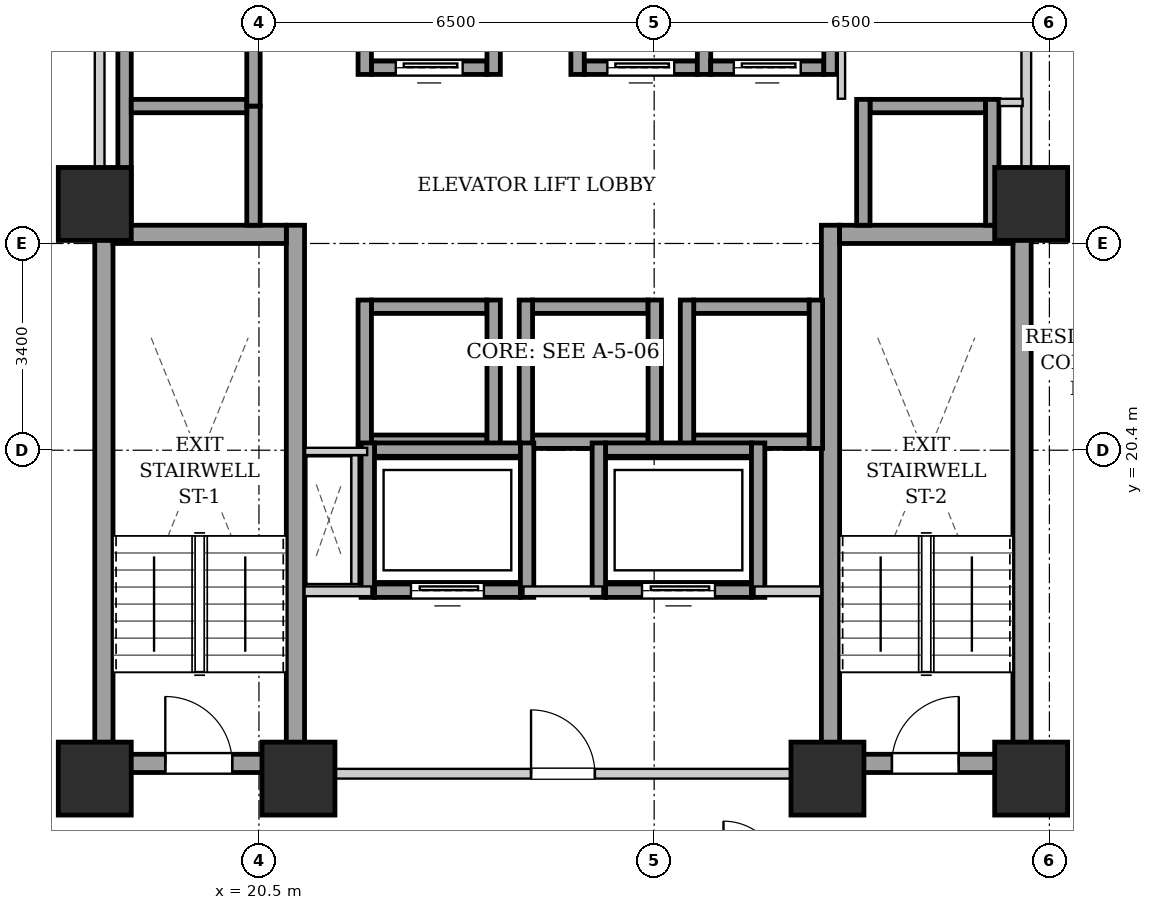
"""IFC4 building model, lengths in metres.
Left out: names, types, materials, properties, quantities, classifications, styles, units other than length and angle.
Written with IfcOpenShell. Run it as: python <this file> out.ifc"""

import sys

from ifc_helpers import new_model, si_unit, direction, frame, frame_2d, origin, origin_2d, place, context, subcontext, project, spatial, rectangle, extrude, element, fill, save


model = new_model("IFC4")
c1 = context("Model", 3, precision=1e-05, world=origin(), true_north=direction((0.0, 1.0)))
c2 = subcontext(c1, "Body", "Model", "MODEL_VIEW")
j1 = project(units=[si_unit("LENGTHUNIT", "METRE"), si_unit("PLANEANGLEUNIT", "RADIAN")], contexts=[c1])
p1 = place(None, origin())
s1 = spatial("IfcSite", under=j1, at=p1, CompositionType="ELEMENT")
p2 = place(p1, origin())
s2 = spatial("IfcBuilding", under=s1, at=p2, CompositionType="ELEMENT")
p3 = place(p2, frame((0.0, 0.0, 57.8)))
s3 = spatial("IfcBuildingStorey", under=s2, at=p3, CompositionType="ELEMENT", Elevation=57.8)
for number, where, z_axis, x_axis in (
    (1, (17.8, 15.0, 0.0), (0.0, 0.0, 1.0), (1.0, 0.0, 0.0)),
    (2, (21.15, 15.0, 0.0), (0.0, 0.0, 1.0), (1.0, 0.0, 0.0)),
    (3, (29.85, 15.0, 0.0), (0.0, 0.0, 1.0), (1.0, 0.0, 0.0)),
    (4, (33.2, 15.0, 0.0), (0.0, 0.0, 1.0), (1.0, 0.0, 0.0)),
    (5, (17.8, 24.45, 0.0), (0.0, 0.0, 1.0), (1.0, 0.0, 0.0)),
    (6, (33.2, 24.45, 0.0), (0.0, 0.0, 1.0), (1.0, 0.0, 0.0)),
):
    element("IfcColumn", number, at=place(p3, frame(where, z_axis=z_axis, x_axis=x_axis)), inside=s3, PredefinedType="COLUMN", context=c2, shape_type="SweptSolid", body=[
        extrude(rectangle(XDim=1.2, YDim=1.2, at=origin_2d()), origin(), (0.0, 0.0, 1.0), 3.2),
    ])
for number, where, z_axis, x_axis in (
    (7, (17.95, 15.1, 0.0), (0.0, 0.0, 1.0), (0.0, 1.0, 0.0)),
    (8, (21.1, 15.1, 0.0), (0.0, 0.0, 1.0), (0.0, 1.0, 0.0)),
):
    element("IfcWall", number, at=place(p3, frame(where, z_axis=z_axis, x_axis=x_axis)), inside=s3, PredefinedType="SHEAR", context=c2, shape_type="SweptSolid", body=[
        extrude(rectangle(XDim=9.0, YDim=0.3, at=frame_2d((4.5, 0.0))), origin(), (0.0, 0.0, 1.0), 2.94),
    ])
p4 = place(p3, frame((18.1, 23.95, 0.0), z_axis=(0.0, 0.0, 1.0), x_axis=(1.0, 0.0, 0.0)))
e9 = element("IfcWall", 9, at=p4, inside=s3, PredefinedType="SHEAR", context=c2, shape_type="SweptSolid", body=[
    extrude(rectangle(XDim=2.85, YDim=0.3, at=frame_2d((1.425, 0.0))), origin(), (0.0, 0.0, 1.0), 2.94),
])
p5 = place(p3, frame((18.1, 15.25, 0.0), z_axis=(0.0, 0.0, 1.0), x_axis=(1.0, 0.0, 0.0)))
e10 = element("IfcWall", 10, at=p5, inside=s3, PredefinedType="SHEAR", context=c2, shape_type="SweptSolid", body=[
    extrude(rectangle(XDim=2.85, YDim=0.3, at=frame_2d((1.425, 0.0))), origin(), (0.0, 0.0, 1.0), 2.94),
])
p6 = place(p5, frame((0.86, 0.0, 0.0)))
e11 = element("IfcOpeningElement", 11, at=p6, cuts=e10, PredefinedType="OPENING", context=c2, shape_type="SweptSolid", body=[
    extrude(rectangle(XDim=1.1, YDim=2.05, at=frame_2d((0.55, 1.025))), frame((0.0, 0.16, 0.0), z_axis=(0.0, -1.0, 0.0), x_axis=(1.0, 0.0, 0.0)), (0.0, 0.0, 1.0), 0.32),
])
for number, where, z_axis, x_axis in (
    (12, (29.9, 15.1, 0.0), (0.0, 0.0, 1.0), (0.0, 1.0, 0.0)),
    (13, (33.05, 15.1, 0.0), (0.0, 0.0, 1.0), (0.0, 1.0, 0.0)),
):
    element("IfcWall", number, at=place(p3, frame(where, z_axis=z_axis, x_axis=x_axis)), inside=s3, PredefinedType="SHEAR", context=c2, shape_type="SweptSolid", body=[
        extrude(rectangle(XDim=9.0, YDim=0.3, at=frame_2d((4.5, 0.0))), origin(), (0.0, 0.0, 1.0), 2.94),
    ])
p7 = place(p3, frame((30.05, 23.95, 0.0), z_axis=(0.0, 0.0, 1.0), x_axis=(1.0, 0.0, 0.0)))
e14 = element("IfcWall", 14, at=p7, inside=s3, PredefinedType="SHEAR", context=c2, shape_type="SweptSolid", body=[
    extrude(rectangle(XDim=2.85, YDim=0.3, at=frame_2d((1.425, 0.0))), origin(), (0.0, 0.0, 1.0), 2.94),
])
p8 = place(p3, frame((30.05, 15.25, 0.0), z_axis=(0.0, 0.0, 1.0), x_axis=(1.0, 0.0, 0.0)))
e15 = element("IfcWall", 15, at=p8, inside=s3, PredefinedType="SHEAR", context=c2, shape_type="SweptSolid", body=[
    extrude(rectangle(XDim=2.85, YDim=0.3, at=frame_2d((1.425, 0.0))), origin(), (0.0, 0.0, 1.0), 2.94),
])
p9 = place(p8, frame((0.86, 0.0, 0.0)))
e16 = element("IfcOpeningElement", 16, at=p9, cuts=e15, PredefinedType="OPENING", context=c2, shape_type="SweptSolid", body=[
    extrude(rectangle(XDim=1.1, YDim=2.05, at=frame_2d((0.55, 1.025))), frame((0.0, 0.16, 0.0), z_axis=(0.0, -1.0, 0.0), x_axis=(1.0, 0.0, 0.0)), (0.0, 0.0, 1.0), 0.32),
])
p10 = place(p3, frame((22.35, 26.69, 0.0), z_axis=(0.0, 0.0, 1.0), x_axis=(1.0, 0.0, 0.0)))
e17 = element("IfcWall", 17, at=p10, inside=s3, PredefinedType="SHEAR", context=c2, shape_type="SweptSolid", body=[
    extrude(rectangle(XDim=1.9, YDim=0.22, at=frame_2d((0.95, 0.0))), origin(), (0.0, 0.0, 1.0), 2.94),
])
p11 = place(p10, frame((0.4, 0.0, 0.0)))
e18 = element("IfcOpeningElement", 18, at=p11, cuts=e17, PredefinedType="OPENING", context=c2, shape_type="SweptSolid", body=[
    extrude(rectangle(XDim=1.1, YDim=2.15, at=frame_2d((0.55, 1.075))), frame((0.0, 0.12, 0.0), z_axis=(0.0, -1.0, 0.0), x_axis=(1.0, 0.0, 0.0)), (0.0, 0.0, 1.0), 0.24),
])
for number, where, z_axis, x_axis in (
    (19, (22.24, 26.58, 0.0), (0.0, 0.0, 1.0), (0.0, 1.0, 0.0)),
    (20, (24.36, 26.58, 0.0), (0.0, 0.0, 1.0), (0.0, 1.0, 0.0)),
):
    element("IfcWall", number, at=place(p3, frame(where, z_axis=z_axis, x_axis=x_axis)), inside=s3, PredefinedType="SHEAR", context=c2, shape_type="SweptSolid", body=[
        extrude(rectangle(XDim=2.44, YDim=0.22, at=frame_2d((1.22, 0.0))), origin(), (0.0, 0.0, 1.0), 2.94),
    ])
p12 = place(p3, frame((25.85, 26.69, 0.0), z_axis=(0.0, 0.0, 1.0), x_axis=(1.0, 0.0, 0.0)))
e21 = element("IfcWall", 21, at=p12, inside=s3, PredefinedType="SHEAR", context=c2, shape_type="SweptSolid", body=[
    extrude(rectangle(XDim=1.86, YDim=0.22, at=frame_2d((0.93, 0.0))), origin(), (0.0, 0.0, 1.0), 2.94),
])
p13 = place(p12, frame((0.38, 0.0, 0.0)))
e22 = element("IfcOpeningElement", 22, at=p13, cuts=e21, PredefinedType="OPENING", context=c2, shape_type="SweptSolid", body=[
    extrude(rectangle(XDim=1.1, YDim=2.15, at=frame_2d((0.55, 1.075))), frame((0.0, 0.12, 0.0), z_axis=(0.0, -1.0, 0.0), x_axis=(1.0, 0.0, 0.0)), (0.0, 0.0, 1.0), 0.24),
])
for number, where, z_axis, x_axis in (
    (23, (25.74, 26.58, 0.0), (0.0, 0.0, 1.0), (0.0, 1.0, 0.0)),
    (24, (27.82, 26.58, 0.0), (0.0, 0.0, 1.0), (0.0, 1.0, 0.0)),
):
    element("IfcWall", number, at=place(p3, frame(where, z_axis=z_axis, x_axis=x_axis)), inside=s3, PredefinedType="SHEAR", context=c2, shape_type="SweptSolid", body=[
        extrude(rectangle(XDim=2.44, YDim=0.22, at=frame_2d((1.22, 0.0))), origin(), (0.0, 0.0, 1.0), 2.94),
    ])
p14 = place(p3, frame((27.93, 26.69, 0.0), z_axis=(0.0, 0.0, 1.0), x_axis=(1.0, 0.0, 0.0)))
e25 = element("IfcWall", 25, at=p14, inside=s3, PredefinedType="SHEAR", context=c2, shape_type="SweptSolid", body=[
    extrude(rectangle(XDim=1.86, YDim=0.22, at=frame_2d((0.93, 0.0))), origin(), (0.0, 0.0, 1.0), 2.94),
])
p15 = place(p14, frame((0.38, 0.0, 0.0)))
e26 = element("IfcOpeningElement", 26, at=p15, cuts=e25, PredefinedType="OPENING", context=c2, shape_type="SweptSolid", body=[
    extrude(rectangle(XDim=1.1, YDim=2.15, at=frame_2d((0.55, 1.075))), frame((0.0, 0.12, 0.0), z_axis=(0.0, -1.0, 0.0), x_axis=(1.0, 0.0, 0.0)), (0.0, 0.0, 1.0), 0.24),
])
p16 = place(p3, frame((29.9, 26.58, 0.0), z_axis=(0.0, 0.0, 1.0), x_axis=(0.0, 1.0, 0.0)))
e27 = element("IfcWall", 27, at=p16, inside=s3, PredefinedType="SHEAR", context=c2, shape_type="SweptSolid", body=[
    extrude(rectangle(XDim=2.44, YDim=0.22, at=frame_2d((1.22, 0.0))), origin(), (0.0, 0.0, 1.0), 2.94),
])
for number, where, z_axis, x_axis in (
    (28, (22.35, 20.54, 0.0), (0.0, 0.0, 1.0), (1.0, 0.0, 0.0)),
    (29, (22.35, 22.76, 0.0), (0.0, 0.0, 1.0), (1.0, 0.0, 0.0)),
):
    element("IfcWall", number, at=place(p3, frame(where, z_axis=z_axis, x_axis=x_axis)), inside=s3, PredefinedType="SHEAR", context=c2, shape_type="SweptSolid", body=[
        extrude(rectangle(XDim=1.9, YDim=0.22, at=frame_2d((0.95, 0.0))), origin(), (0.0, 0.0, 1.0), 2.94),
    ])
for number, where, z_axis, x_axis in (
    (30, (22.24, 20.43, 0.0), (0.0, 0.0, 1.0), (0.0, 1.0, 0.0)),
    (31, (24.36, 20.43, 0.0), (0.0, 0.0, 1.0), (0.0, 1.0, 0.0)),
):
    element("IfcWall", number, at=place(p3, frame(where, z_axis=z_axis, x_axis=x_axis)), inside=s3, PredefinedType="SHEAR", context=c2, shape_type="SweptSolid", body=[
        extrude(rectangle(XDim=2.44, YDim=0.22, at=frame_2d((1.22, 0.0))), origin(), (0.0, 0.0, 1.0), 2.94),
    ])
for number, where, z_axis, x_axis in (
    (32, (25.0, 20.54, 0.0), (0.0, 0.0, 1.0), (1.0, 0.0, 0.0)),
    (33, (25.0, 22.76, 0.0), (0.0, 0.0, 1.0), (1.0, 0.0, 0.0)),
):
    element("IfcWall", number, at=place(p3, frame(where, z_axis=z_axis, x_axis=x_axis)), inside=s3, PredefinedType="SHEAR", context=c2, shape_type="SweptSolid", body=[
        extrude(rectangle(XDim=1.9, YDim=0.22, at=frame_2d((0.95, 0.0))), origin(), (0.0, 0.0, 1.0), 2.94),
    ])
for number, where, z_axis, x_axis in (
    (34, (24.89, 20.43, 0.0), (0.0, 0.0, 1.0), (0.0, 1.0, 0.0)),
    (35, (27.01, 20.43, 0.0), (0.0, 0.0, 1.0), (0.0, 1.0, 0.0)),
):
    element("IfcWall", number, at=place(p3, frame(where, z_axis=z_axis, x_axis=x_axis)), inside=s3, PredefinedType="SHEAR", context=c2, shape_type="SweptSolid", body=[
        extrude(rectangle(XDim=2.44, YDim=0.22, at=frame_2d((1.22, 0.0))), origin(), (0.0, 0.0, 1.0), 2.94),
    ])
for number, where, z_axis, x_axis in (
    (36, (27.65, 20.54, 0.0), (0.0, 0.0, 1.0), (1.0, 0.0, 0.0)),
    (37, (27.65, 22.76, 0.0), (0.0, 0.0, 1.0), (1.0, 0.0, 0.0)),
):
    element("IfcWall", number, at=place(p3, frame(where, z_axis=z_axis, x_axis=x_axis)), inside=s3, PredefinedType="SHEAR", context=c2, shape_type="SweptSolid", body=[
        extrude(rectangle(XDim=1.9, YDim=0.22, at=frame_2d((0.95, 0.0))), origin(), (0.0, 0.0, 1.0), 2.94),
    ])
for number, where, z_axis, x_axis in (
    (38, (27.54, 20.43, 0.0), (0.0, 0.0, 1.0), (0.0, 1.0, 0.0)),
    (39, (29.66, 20.43, 0.0), (0.0, 0.0, 1.0), (0.0, 1.0, 0.0)),
):
    element("IfcWall", number, at=place(p3, frame(where, z_axis=z_axis, x_axis=x_axis)), inside=s3, PredefinedType="SHEAR", context=c2, shape_type="SweptSolid", body=[
        extrude(rectangle(XDim=2.44, YDim=0.22, at=frame_2d((1.22, 0.0))), origin(), (0.0, 0.0, 1.0), 2.94),
    ])
p17 = place(p3, frame((18.29, 24.1, 0.0), z_axis=(0.0, 0.0, 1.0), x_axis=(0.0, 1.0, 0.0)))
e40 = element("IfcWall", 40, at=p17, inside=s3, PredefinedType="SHEAR", context=c2, shape_type="SweptSolid", body=[
    extrude(rectangle(XDim=4.14, YDim=0.22, at=frame_2d((2.07, 0.0))), origin(), (0.0, 0.0, 1.0), 2.94),
])
p18 = place(p3, frame((20.41, 24.1, 0.0), z_axis=(0.0, 0.0, 1.0), x_axis=(0.0, 1.0, 0.0)))
e41 = element("IfcWall", 41, at=p18, inside=s3, PredefinedType="SHEAR", context=c2, shape_type="SweptSolid", body=[
    extrude(rectangle(XDim=1.96, YDim=0.22, at=frame_2d((0.98, 0.0))), origin(), (0.0, 0.0, 1.0), 2.94),
])
p19 = place(p3, frame((18.4, 26.06, 0.0), z_axis=(0.0, 0.0, 1.0), x_axis=(1.0, 0.0, 0.0)))
e42 = element("IfcWall", 42, at=p19, inside=s3, PredefinedType="SHEAR", context=c2, shape_type="SweptSolid", body=[
    extrude(rectangle(XDim=1.9, YDim=0.22, at=frame_2d((0.95, 0.0))), origin(), (0.0, 0.0, 1.0), 2.94),
])
p20 = place(p3, frame((20.41, 26.06, 0.0), z_axis=(0.0, 0.0, 1.0), x_axis=(0.0, 1.0, 0.0)))
e43 = element("IfcWall", 43, at=p20, inside=s3, PredefinedType="SHEAR", context=c2, shape_type="SweptSolid", body=[
    extrude(rectangle(XDim=2.18, YDim=0.22, at=frame_2d((1.09, 0.0))), origin(), (0.0, 0.0, 1.0), 2.94),
])
p21 = place(p3, frame((30.55, 26.06, 0.0), z_axis=(0.0, 0.0, 1.0), x_axis=(1.0, 0.0, 0.0)))
e44 = element("IfcWall", 44, at=p21, inside=s3, PredefinedType="SHEAR", context=c2, shape_type="SweptSolid", body=[
    extrude(rectangle(XDim=1.9, YDim=0.22, at=frame_2d((0.95, 0.0))), origin(), (0.0, 0.0, 1.0), 2.94),
])
for number, where, z_axis, x_axis in (
    (45, (30.44, 24.1, 0.0), (0.0, 0.0, 1.0), (0.0, 1.0, 0.0)),
    (46, (32.56, 24.1, 0.0), (0.0, 0.0, 1.0), (0.0, 1.0, 0.0)),
):
    element("IfcWall", number, at=place(p3, frame(where, z_axis=z_axis, x_axis=x_axis)), inside=s3, PredefinedType="SHEAR", context=c2, shape_type="SweptSolid", body=[
        extrude(rectangle(XDim=2.07, YDim=0.22, at=frame_2d((1.035, 0.0))), origin(), (0.0, 0.0, 1.0), 2.94),
    ])
p22 = place(p3, frame((22.4, 18.09, 0.0), z_axis=(0.0, 0.0, 1.0), x_axis=(1.0, 0.0, 0.0)))
e47 = element("IfcWall", 47, at=p22, inside=s3, PredefinedType="SHEAR", context=c2, shape_type="SweptSolid", body=[
    extrude(rectangle(XDim=2.4, YDim=0.22, at=frame_2d((1.2, 0.0))), origin(), (0.0, 0.0, 1.0), 2.94),
])
p23 = place(p22, frame((0.6, 0.0, 0.0)))
e48 = element("IfcOpeningElement", 48, at=p23, cuts=e47, PredefinedType="OPENING", context=c2, shape_type="SweptSolid", body=[
    extrude(rectangle(XDim=1.2, YDim=2.15, at=frame_2d((0.6, 1.075))), frame((0.0, 0.12, 0.0), z_axis=(0.0, -1.0, 0.0), x_axis=(1.0, 0.0, 0.0)), (0.0, 0.0, 1.0), 0.24),
])
p24 = place(p3, frame((22.4, 20.41, 0.0), z_axis=(0.0, 0.0, 1.0), x_axis=(1.0, 0.0, 0.0)))
e49 = element("IfcWall", 49, at=p24, inside=s3, PredefinedType="SHEAR", context=c2, shape_type="SweptSolid", body=[
    extrude(rectangle(XDim=2.4, YDim=0.22, at=frame_2d((1.2, 0.0))), origin(), (0.0, 0.0, 1.0), 2.94),
])
for number, where, z_axis, x_axis in (
    (50, (22.29, 17.98, 0.0), (0.0, 0.0, 1.0), (0.0, 1.0, 0.0)),
    (51, (24.91, 17.98, 0.0), (0.0, 0.0, 1.0), (0.0, 1.0, 0.0)),
):
    element("IfcWall", number, at=place(p3, frame(where, z_axis=z_axis, x_axis=x_axis)), inside=s3, PredefinedType="SHEAR", context=c2, shape_type="SweptSolid", body=[
        extrude(rectangle(XDim=2.54, YDim=0.22, at=frame_2d((1.27, 0.0))), origin(), (0.0, 0.0, 1.0), 2.94),
    ])
p25 = place(p3, frame((26.2, 18.09, 0.0), z_axis=(0.0, 0.0, 1.0), x_axis=(1.0, 0.0, 0.0)))
e52 = element("IfcWall", 52, at=p25, inside=s3, PredefinedType="SHEAR", context=c2, shape_type="SweptSolid", body=[
    extrude(rectangle(XDim=2.4, YDim=0.22, at=frame_2d((1.2, 0.0))), origin(), (0.0, 0.0, 1.0), 2.94),
])
p26 = place(p25, frame((0.6, 0.0, 0.0)))
e53 = element("IfcOpeningElement", 53, at=p26, cuts=e52, PredefinedType="OPENING", context=c2, shape_type="SweptSolid", body=[
    extrude(rectangle(XDim=1.2, YDim=2.15, at=frame_2d((0.6, 1.075))), frame((0.0, 0.12, 0.0), z_axis=(0.0, -1.0, 0.0), x_axis=(1.0, 0.0, 0.0)), (0.0, 0.0, 1.0), 0.24),
])
p27 = place(p3, frame((26.2, 20.41, 0.0), z_axis=(0.0, 0.0, 1.0), x_axis=(1.0, 0.0, 0.0)))
e54 = element("IfcWall", 54, at=p27, inside=s3, PredefinedType="SHEAR", context=c2, shape_type="SweptSolid", body=[
    extrude(rectangle(XDim=2.4, YDim=0.22, at=frame_2d((1.2, 0.0))), origin(), (0.0, 0.0, 1.0), 2.94),
])
for number, where, z_axis, x_axis in (
    (55, (26.09, 17.98, 0.0), (0.0, 0.0, 1.0), (0.0, 1.0, 0.0)),
    (56, (28.71, 17.98, 0.0), (0.0, 0.0, 1.0), (0.0, 1.0, 0.0)),
):
    element("IfcWall", number, at=place(p3, frame(where, z_axis=z_axis, x_axis=x_axis)), inside=s3, PredefinedType="SHEAR", context=c2, shape_type="SweptSolid", body=[
        extrude(rectangle(XDim=2.54, YDim=0.22, at=frame_2d((1.27, 0.0))), origin(), (0.0, 0.0, 1.0), 2.94),
    ])
p28 = place(p3, frame((21.25, 15.08, 0.0), z_axis=(0.0, 0.0, 1.0), x_axis=(1.0, 0.0, 0.0)))
e57 = element("IfcWall", 57, at=p28, inside=s3, PredefinedType="PARTITIONING", context=c2, shape_type="SweptSolid", body=[
    extrude(rectangle(XDim=8.5, YDim=0.16, at=frame_2d((4.25, 0.0))), origin(), (0.0, 0.0, 1.0), 2.232),
])
p29 = place(p28, frame((3.725, 0.0, 0.0)))
e58 = element("IfcOpeningElement", 58, at=p29, cuts=e57, PredefinedType="OPENING", context=c2, shape_type="SweptSolid", body=[
    extrude(rectangle(XDim=1.05, YDim=2.05, at=frame_2d((0.525, 1.025))), frame((0.0, 0.09, 0.0), z_axis=(0.0, -1.0, 0.0), x_axis=(1.0, 0.0, 0.0)), (0.0, 0.0, 1.0), 0.18),
])
p30 = place(p3, frame((21.25, 18.08, 0.0), z_axis=(0.0, 0.0, 1.0), x_axis=(1.0, 0.0, 0.0)))
e59 = element("IfcWall", 59, at=p30, inside=s3, PredefinedType="PARTITIONING", context=c2, shape_type="SweptSolid", body=[
    extrude(rectangle(XDim=1.1, YDim=0.16, at=frame_2d((0.55, 0.0))), origin(), (0.0, 0.0, 1.0), 2.94),
])
p31 = place(p3, frame((24.85, 18.08, 0.0), z_axis=(0.0, 0.0, 1.0), x_axis=(1.0, 0.0, 0.0)))
e60 = element("IfcWall", 60, at=p31, inside=s3, PredefinedType="PARTITIONING", context=c2, shape_type="SweptSolid", body=[
    extrude(rectangle(XDim=1.3, YDim=0.16, at=frame_2d((0.65, 0.0))), origin(), (0.0, 0.0, 1.0), 2.94),
])
p32 = place(p3, frame((28.65, 18.08, 0.0), z_axis=(0.0, 0.0, 1.0), x_axis=(1.0, 0.0, 0.0)))
e61 = element("IfcWall", 61, at=p32, inside=s3, PredefinedType="PARTITIONING", context=c2, shape_type="SweptSolid", body=[
    extrude(rectangle(XDim=1.1, YDim=0.16, at=frame_2d((0.55, 0.0))), origin(), (0.0, 0.0, 1.0), 2.94),
])
for number, where, z_axis, x_axis in (
    (62, (17.88, 24.12, 0.0), (0.0, 0.0, 1.0), (0.0, 1.0, 0.0)),
    (63, (33.12, 24.12, 0.0), (0.0, 0.0, 1.0), (0.0, 1.0, 0.0)),
):
    element("IfcWall", number, at=place(p3, frame(where, z_axis=z_axis, x_axis=x_axis)), inside=s3, PredefinedType="PARTITIONING", context=c2, shape_type="SweptSolid", body=[
        extrude(rectangle(XDim=4.76, YDim=0.16, at=frame_2d((2.38, 0.0))), origin(), (0.0, 0.0, 1.0), 2.275),
    ])
p33 = place(p3, frame((22.08, 18.2, 0.0), z_axis=(0.0, 0.0, 1.0), x_axis=(0.0, 1.0, 0.0)))
e64 = element("IfcWall", 64, at=p33, inside=s3, PredefinedType="PARTITIONING", context=c2, shape_type="SweptSolid", body=[
    extrude(rectangle(XDim=2.12, YDim=0.12, at=frame_2d((1.06, 0.0))), origin(), (0.0, 0.0, 1.0), 2.94),
])
p34 = place(p3, frame((22.28, 20.38, 0.0), z_axis=(0.0, 0.0, 1.0), x_axis=(-1.0, 0.0, 0.0)))
e65 = element("IfcWall", 65, at=p34, inside=s3, PredefinedType="PARTITIONING", context=c2, shape_type="SweptSolid", body=[
    extrude(rectangle(XDim=1.02, YDim=0.12, at=frame_2d((0.51, 0.0))), origin(), (0.0, 0.0, 1.0), 2.94),
])
p35 = place(p3, frame((30.08, 26.18, 0.0), z_axis=(0.0, 0.0, 1.0), x_axis=(0.0, 1.0, 0.0)))
e66 = element("IfcWall", 66, at=p35, inside=s3, PredefinedType="PARTITIONING", context=c2, shape_type="SweptSolid", body=[
    extrude(rectangle(XDim=2.68, YDim=0.12, at=frame_2d((1.34, 0.0))), origin(), (0.0, 0.0, 1.0), 2.94),
])
p36 = place(p3, frame((32.68, 26.12, 0.0), z_axis=(0.0, 0.0, 1.0), x_axis=(1.0, 0.0, 0.0)))
e67 = element("IfcWall", 67, at=p36, inside=s3, PredefinedType="PARTITIONING", context=c2, shape_type="SweptSolid", body=[
    extrude(rectangle(XDim=0.38, YDim=0.12, at=frame_2d((0.19, 0.0))), origin(), (0.0, 0.0, 1.0), 2.94),
])
p37 = place(p6, origin())
e68 = element("IfcDoor", 68, at=p37, inside=s3, OperationType="SINGLE_SWING_LEFT", PredefinedType="DOOR", context=c2, shape_type="SweptSolid", body=[
    extrude(rectangle(XDim=1.1, YDim=2.05, at=frame_2d((0.55, 1.025))), frame((0.0, 0.025, 0.0), z_axis=(0.0, -1.0, 0.0), x_axis=(1.0, 0.0, 0.0)), (0.0, 0.0, 1.0), 0.05),
])
fill(e11, e68)
p38 = place(p9, origin())
e69 = element("IfcDoor", 69, at=p38, inside=s3, OperationType="SINGLE_SWING_RIGHT", PredefinedType="DOOR", context=c2, shape_type="SweptSolid", body=[
    extrude(rectangle(XDim=1.1, YDim=2.05, at=frame_2d((0.55, 1.025))), frame((0.0, 0.025, 0.0), z_axis=(0.0, -1.0, 0.0), x_axis=(1.0, 0.0, 0.0)), (0.0, 0.0, 1.0), 0.05),
])
fill(e16, e69)
p39 = place(p11, origin())
e70 = element("IfcDoor", 70, at=p39, inside=s3, OperationType="SLIDING_TO_LEFT", PredefinedType="DOOR", context=c2, shape_type="SweptSolid", body=[
    extrude(rectangle(XDim=1.1, YDim=2.15, at=frame_2d((0.55, 1.075))), frame((0.0, 0.025, 0.0), z_axis=(0.0, -1.0, 0.0), x_axis=(1.0, 0.0, 0.0)), (0.0, 0.0, 1.0), 0.05),
])
fill(e18, e70)
p40 = place(p13, origin())
e71 = element("IfcDoor", 71, at=p40, inside=s3, OperationType="SLIDING_TO_LEFT", PredefinedType="DOOR", context=c2, shape_type="SweptSolid", body=[
    extrude(rectangle(XDim=1.1, YDim=2.15, at=frame_2d((0.55, 1.075))), frame((0.0, 0.025, 0.0), z_axis=(0.0, -1.0, 0.0), x_axis=(1.0, 0.0, 0.0)), (0.0, 0.0, 1.0), 0.05),
])
fill(e22, e71)
p41 = place(p15, origin())
e72 = element("IfcDoor", 72, at=p41, inside=s3, OperationType="SLIDING_TO_LEFT", PredefinedType="DOOR", context=c2, shape_type="SweptSolid", body=[
    extrude(rectangle(XDim=1.1, YDim=2.15, at=frame_2d((0.55, 1.075))), frame((0.0, 0.025, 0.0), z_axis=(0.0, -1.0, 0.0), x_axis=(1.0, 0.0, 0.0)), (0.0, 0.0, 1.0), 0.05),
])
fill(e26, e72)
p42 = place(p23, origin())
e73 = element("IfcDoor", 73, at=p42, inside=s3, OperationType="SLIDING_TO_LEFT", PredefinedType="DOOR", context=c2, shape_type="SweptSolid", body=[
    extrude(rectangle(XDim=1.2, YDim=2.15, at=frame_2d((0.6, 1.075))), frame((0.0, 0.025, 0.0), z_axis=(0.0, -1.0, 0.0), x_axis=(1.0, 0.0, 0.0)), (0.0, 0.0, 1.0), 0.05),
])
fill(e48, e73)
p43 = place(p26, origin())
e74 = element("IfcDoor", 74, at=p43, inside=s3, OperationType="SLIDING_TO_LEFT", PredefinedType="DOOR", context=c2, shape_type="SweptSolid", body=[
    extrude(rectangle(XDim=1.2, YDim=2.15, at=frame_2d((0.6, 1.075))), frame((0.0, 0.025, 0.0), z_axis=(0.0, -1.0, 0.0), x_axis=(1.0, 0.0, 0.0)), (0.0, 0.0, 1.0), 0.05),
])
fill(e53, e74)
p44 = place(p29, origin())
e75 = element("IfcDoor", 75, at=p44, inside=s3, OperationType="SINGLE_SWING_LEFT", PredefinedType="DOOR", context=c2, shape_type="SweptSolid", body=[
    extrude(rectangle(XDim=1.05, YDim=2.05, at=frame_2d((0.525, 1.025))), frame((0.0, 0.025, 0.0), z_axis=(0.0, -1.0, 0.0), x_axis=(1.0, 0.0, 0.0)), (0.0, 0.0, 1.0), 0.05),
])
fill(e58, e75)
save(model, sys.argv[1])
